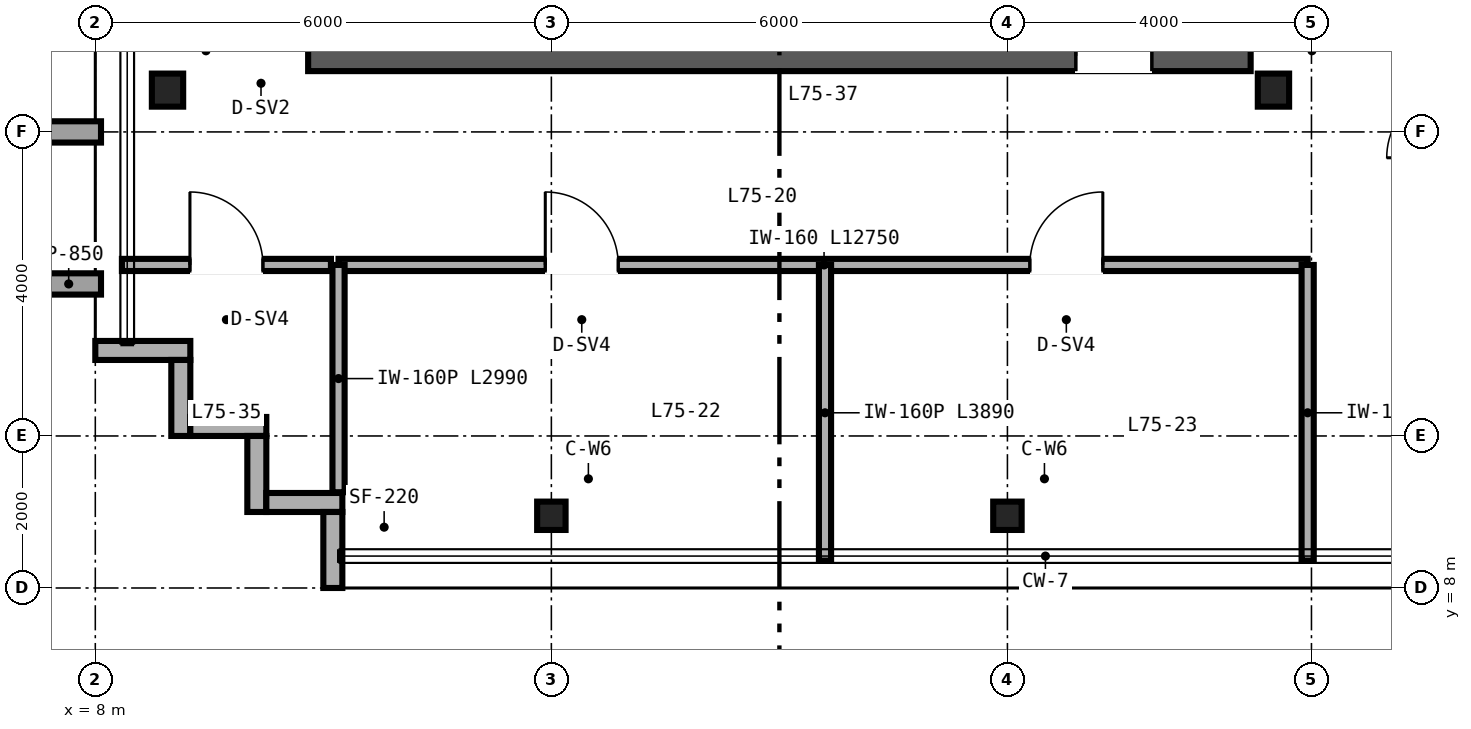
"""IFC4 building model, lengths in metres.
Left out: names, types, materials, properties, quantities, classifications, styles, units other than length and angle.
Written with IfcOpenShell. Run it as: python <this file> out.ifc"""

import sys

from ifc_helpers import new_model, si_unit, direction, frame, frame_2d, origin, origin_2d, place, context, subcontext, project, spatial, rectangle, i_section, extrude, source, transform, mapped, element, fill, save


model = new_model("IFC4")
c1 = context("Model", 3, precision=1e-05, world=origin(), true_north=direction((0.0, 1.0)))
c2 = subcontext(c1, "Body", "Model", "MODEL_VIEW")
j1 = project(units=[si_unit("LENGTHUNIT", "METRE"), si_unit("PLANEANGLEUNIT", "RADIAN")], contexts=[c1])
p1 = place(None, origin())
s1 = spatial("IfcSite", under=j1, at=p1, CompositionType="ELEMENT")
p2 = place(p1, origin())
s2 = spatial("IfcBuilding", under=s1, at=p2, CompositionType="ELEMENT")
p3 = place(p2, frame((0.0, 0.0, 294.0)))
s3 = spatial("IfcBuildingStorey", under=s2, at=p3, CompositionType="ELEMENT", Elevation=294.0)
p4 = place(p3, frame((10.8, 15.0, 0.0), z_axis=(0.0, 0.0, 1.0), x_axis=(1.0, 0.0, 0.0)))
e1 = element("IfcWall", 1, at=p4, inside=s3, PredefinedType="SHEAR", context=c2, shape_type="SweptSolid", body=[
    extrude(rectangle(XDim=12.4, YDim=0.4, at=frame_2d((6.2, 0.0))), origin(), (0.0, 0.0, 1.0), 3.38),
])
p5 = place(p4, frame((10.1, 0.0, 0.0)))
e2 = element("IfcOpeningElement", 2, at=p5, cuts=e1, PredefinedType="OPENING", context=c2, shape_type="SweptSolid", body=[
    extrude(rectangle(XDim=1.0, YDim=2.15, at=frame_2d((0.5, 1.075))), frame((0.0, 0.21, 0.0), z_axis=(0.0, -1.0, 0.0), x_axis=(1.0, 0.0, 0.0)), (0.0, 0.0, 1.0), 0.42),
])
m1 = source(origin(), c2, "Body", "SweptSolid", [
    extrude(i_section(OverallWidth=0.412, OverallDepth=0.435, WebThickness=0.036, FlangeThickness=0.057, FilletRadius=0.025, at=origin_2d()), origin(), (0.0, 0.0, 1.0), 3.38),
])
for number, where, z_axis, x_axis in (
    (3, (8.95, 14.55, 0.0), (0.0, 0.0, 1.0), (1.0, 0.0, 0.0)),
    (4, (23.5, 14.55, 0.0), (0.0, 0.0, 1.0), (1.0, 0.0, 0.0)),
):
    element("IfcColumn", number, at=place(p3, frame(where, z_axis=z_axis, x_axis=x_axis)), inside=s3, PredefinedType="COLUMN", context=c2, shape_type="MappedRepresentation", body=[
        mapped(m1, transform((0.0, 0.0, 0.0), scale=1.0)),
    ])
m2 = source(origin(), c2, "Body", "SweptSolid", [
    extrude(i_section(OverallWidth=0.374, OverallDepth=0.373, WebThickness=0.016, FlangeThickness=0.026, FilletRadius=0.025, at=origin_2d()), origin(), (0.0, 0.0, 1.0), 3.38),
])
for number, where, z_axis, x_axis in (
    (5, (14.0, 8.95, 0.0), (0.0, 0.0, 1.0), (1.0, 0.0, 0.0)),
    (6, (20.0, 8.95, 0.0), (0.0, 0.0, 1.0), (1.0, 0.0, 0.0)),
):
    element("IfcColumn", number, at=place(p3, frame(where, z_axis=z_axis, x_axis=x_axis)), inside=s3, PredefinedType="COLUMN", context=c2, shape_type="MappedRepresentation", body=[
        mapped(m2, transform((0.0, 0.0, 0.0), scale=1.0)),
    ])
p6 = place(p3, frame((8.0, 11.125, 0.0), z_axis=(0.0, 0.0, 1.0), x_axis=(1.0, 0.0, 0.0)))
e7 = element("IfcWall", 7, at=p6, inside=s3, PredefinedType="SOLIDWALL", context=c2, shape_type="SweptSolid", body=[
    extrude(rectangle(XDim=1.25, YDim=0.25, at=frame_2d((0.625, 0.0))), origin(), (0.0, 0.0, 1.0), 3.38),
])
for number, where, z_axis, x_axis in (
    (8, (9.125, 11.0, 0.0), (0.0, 0.0, 1.0), (0.0, -1.0, 0.0)),
    (9, (9.25, 10.125, 0.0), (0.0, 0.0, 1.0), (1.0, 0.0, 0.0)),
    (10, (10.125, 10.0, 0.0), (0.0, 0.0, 1.0), (0.0, -1.0, 0.0)),
    (11, (10.25, 9.125, 0.0), (0.0, 0.0, 1.0), (1.0, 0.0, 0.0)),
    (12, (11.125, 9.0, 0.0), (0.0, 0.0, 1.0), (0.0, -1.0, 0.0)),
):
    element("IfcWall", number, at=place(p3, frame(where, z_axis=z_axis, x_axis=x_axis)), inside=s3, PredefinedType="SOLIDWALL", context=c2, shape_type="SweptSolid", body=[
        extrude(rectangle(XDim=1.0, YDim=0.25, at=frame_2d((0.5, 0.0))), origin(), (0.0, 0.0, 1.0), 3.38),
    ])
p7 = place(p3, frame((11.2, 12.25, 0.0), z_axis=(0.0, 0.0, 1.0), x_axis=(1.0, 0.0, 0.0)))
e13 = element("IfcWall", 13, at=p7, inside=s3, PredefinedType="PARTITIONING", context=c2, shape_type="SweptSolid", body=[
    extrude(rectangle(XDim=12.75, YDim=0.16, at=frame_2d((6.375, 0.0))), origin(), (0.0, 0.0, 1.0), 3.38),
])
p8 = place(p7, frame((2.72, 0.0, 0.0)))
e14 = element("IfcOpeningElement", 14, at=p8, cuts=e13, PredefinedType="OPENING", context=c2, shape_type="SweptSolid", body=[
    extrude(rectangle(XDim=0.96, YDim=2.15, at=frame_2d((0.48, 1.075))), frame((0.0, 0.09, 0.0), z_axis=(0.0, -1.0, 0.0), x_axis=(1.0, 0.0, 0.0)), (0.0, 0.0, 1.0), 0.18),
])
p9 = place(p7, frame((9.095, 0.0, 0.0)))
e15 = element("IfcOpeningElement", 15, at=p9, cuts=e13, PredefinedType="OPENING", context=c2, shape_type="SweptSolid", body=[
    extrude(rectangle(XDim=0.96, YDim=2.15, at=frame_2d((0.48, 1.075))), frame((0.0, 0.09, 0.0), z_axis=(0.0, -1.0, 0.0), x_axis=(1.0, 0.0, 0.0)), (0.0, 0.0, 1.0), 0.18),
])
p10 = place(p3, frame((11.2, 9.26, 0.0), z_axis=(0.0, 0.0, 1.0), x_axis=(0.0, 1.0, 0.0)))
e16 = element("IfcWall", 16, at=p10, inside=s3, PredefinedType="PARTITIONING", context=c2, shape_type="SweptSolid", body=[
    extrude(rectangle(XDim=2.99, YDim=0.16, at=frame_2d((1.495, 0.0))), origin(), (0.0, 0.0, 1.0), 3.38),
])
p11 = place(p3, frame((23.95, 8.36, 0.0), z_axis=(0.0, 0.0, 1.0), x_axis=(0.0, 1.0, 0.0)))
e17 = element("IfcWall", 17, at=p11, inside=s3, PredefinedType="PARTITIONING", context=c2, shape_type="SweptSolid", body=[
    extrude(rectangle(XDim=3.89, YDim=0.16, at=frame_2d((1.945, 0.0))), origin(), (0.0, 0.0, 1.0), 3.38),
])
p12 = place(p3, frame((17.6, 8.36, 0.0), z_axis=(0.0, 0.0, 1.0), x_axis=(0.0, 1.0, 0.0)))
e18 = element("IfcWall", 18, at=p12, inside=s3, PredefinedType="PARTITIONING", context=c2, shape_type="SweptSolid", body=[
    extrude(rectangle(XDim=3.89, YDim=0.16, at=frame_2d((1.945, 0.0))), origin(), (0.0, 0.0, 1.0), 2.687),
])
p13 = place(p3, frame((8.35, 12.25, 0.0), z_axis=(0.0, 0.0, 1.0), x_axis=(1.0, 0.0, 0.0)))
e19 = element("IfcWall", 19, at=p13, inside=s3, PredefinedType="PARTITIONING", context=c2, shape_type="SweptSolid", body=[
    extrude(rectangle(XDim=2.75, YDim=0.16, at=frame_2d((1.375, 0.0))), origin(), (0.0, 0.0, 1.0), 3.38),
])
p14 = place(p13, frame((0.895, 0.0, 0.0)))
e20 = element("IfcOpeningElement", 20, at=p14, cuts=e19, PredefinedType="OPENING", context=c2, shape_type="SweptSolid", body=[
    extrude(rectangle(XDim=0.96, YDim=2.15, at=frame_2d((0.48, 1.075))), frame((0.0, 0.09, 0.0), z_axis=(0.0, -1.0, 0.0), x_axis=(1.0, 0.0, 0.0)), (0.0, 0.0, 1.0), 0.18),
])
m3 = source(origin(), c2, "Body", "SweptSolid", [
    extrude(rectangle(XDim=1.0, YDim=2.15, at=frame_2d((0.5, 1.075))), frame((0.0, 0.025, 0.0), z_axis=(0.0, -1.0, 0.0), x_axis=(1.0, 0.0, 0.0)), (0.0, 0.0, 1.0), 0.05),
])
p15 = place(p5, origin())
e21 = element("IfcDoor", 21, at=p15, inside=s3, OperationType="SINGLE_SWING_LEFT", PredefinedType="DOOR", context=c2, shape_type="MappedRepresentation", body=[
    mapped(m3, transform((0.0, 0.0, 0.0), scale=1.0)),
])
fill(e2, e21)
m4 = source(origin(), c2, "Body", "SweptSolid", [
    extrude(rectangle(XDim=0.96, YDim=2.15, at=frame_2d((0.48, 1.075))), frame((0.0, 0.025, 0.0), z_axis=(0.0, -1.0, 0.0), x_axis=(1.0, 0.0, 0.0)), (0.0, 0.0, 1.0), 0.05),
])
p16 = place(p8, origin())
e22 = element("IfcDoor", 22, at=p16, inside=s3, OperationType="SINGLE_SWING_LEFT", PredefinedType="DOOR", context=c2, shape_type="MappedRepresentation", body=[
    mapped(m4, transform((0.0, 0.0, 0.0), scale=1.0)),
])
fill(e14, e22)
p17 = place(p9, origin())
e23 = element("IfcDoor", 23, at=p17, inside=s3, OperationType="SINGLE_SWING_RIGHT", PredefinedType="DOOR", context=c2, shape_type="MappedRepresentation", body=[
    mapped(m4, transform((0.0, 0.0, 0.0), scale=1.0)),
])
fill(e15, e23)
p18 = place(p14, origin())
e24 = element("IfcDoor", 24, at=p18, inside=s3, OperationType="SINGLE_SWING_LEFT", PredefinedType="DOOR", context=c2, shape_type="MappedRepresentation", body=[
    mapped(m4, transform((0.0, 0.0, 0.0), scale=1.0)),
])
fill(e20, e24)
save(model, sys.argv[1])
